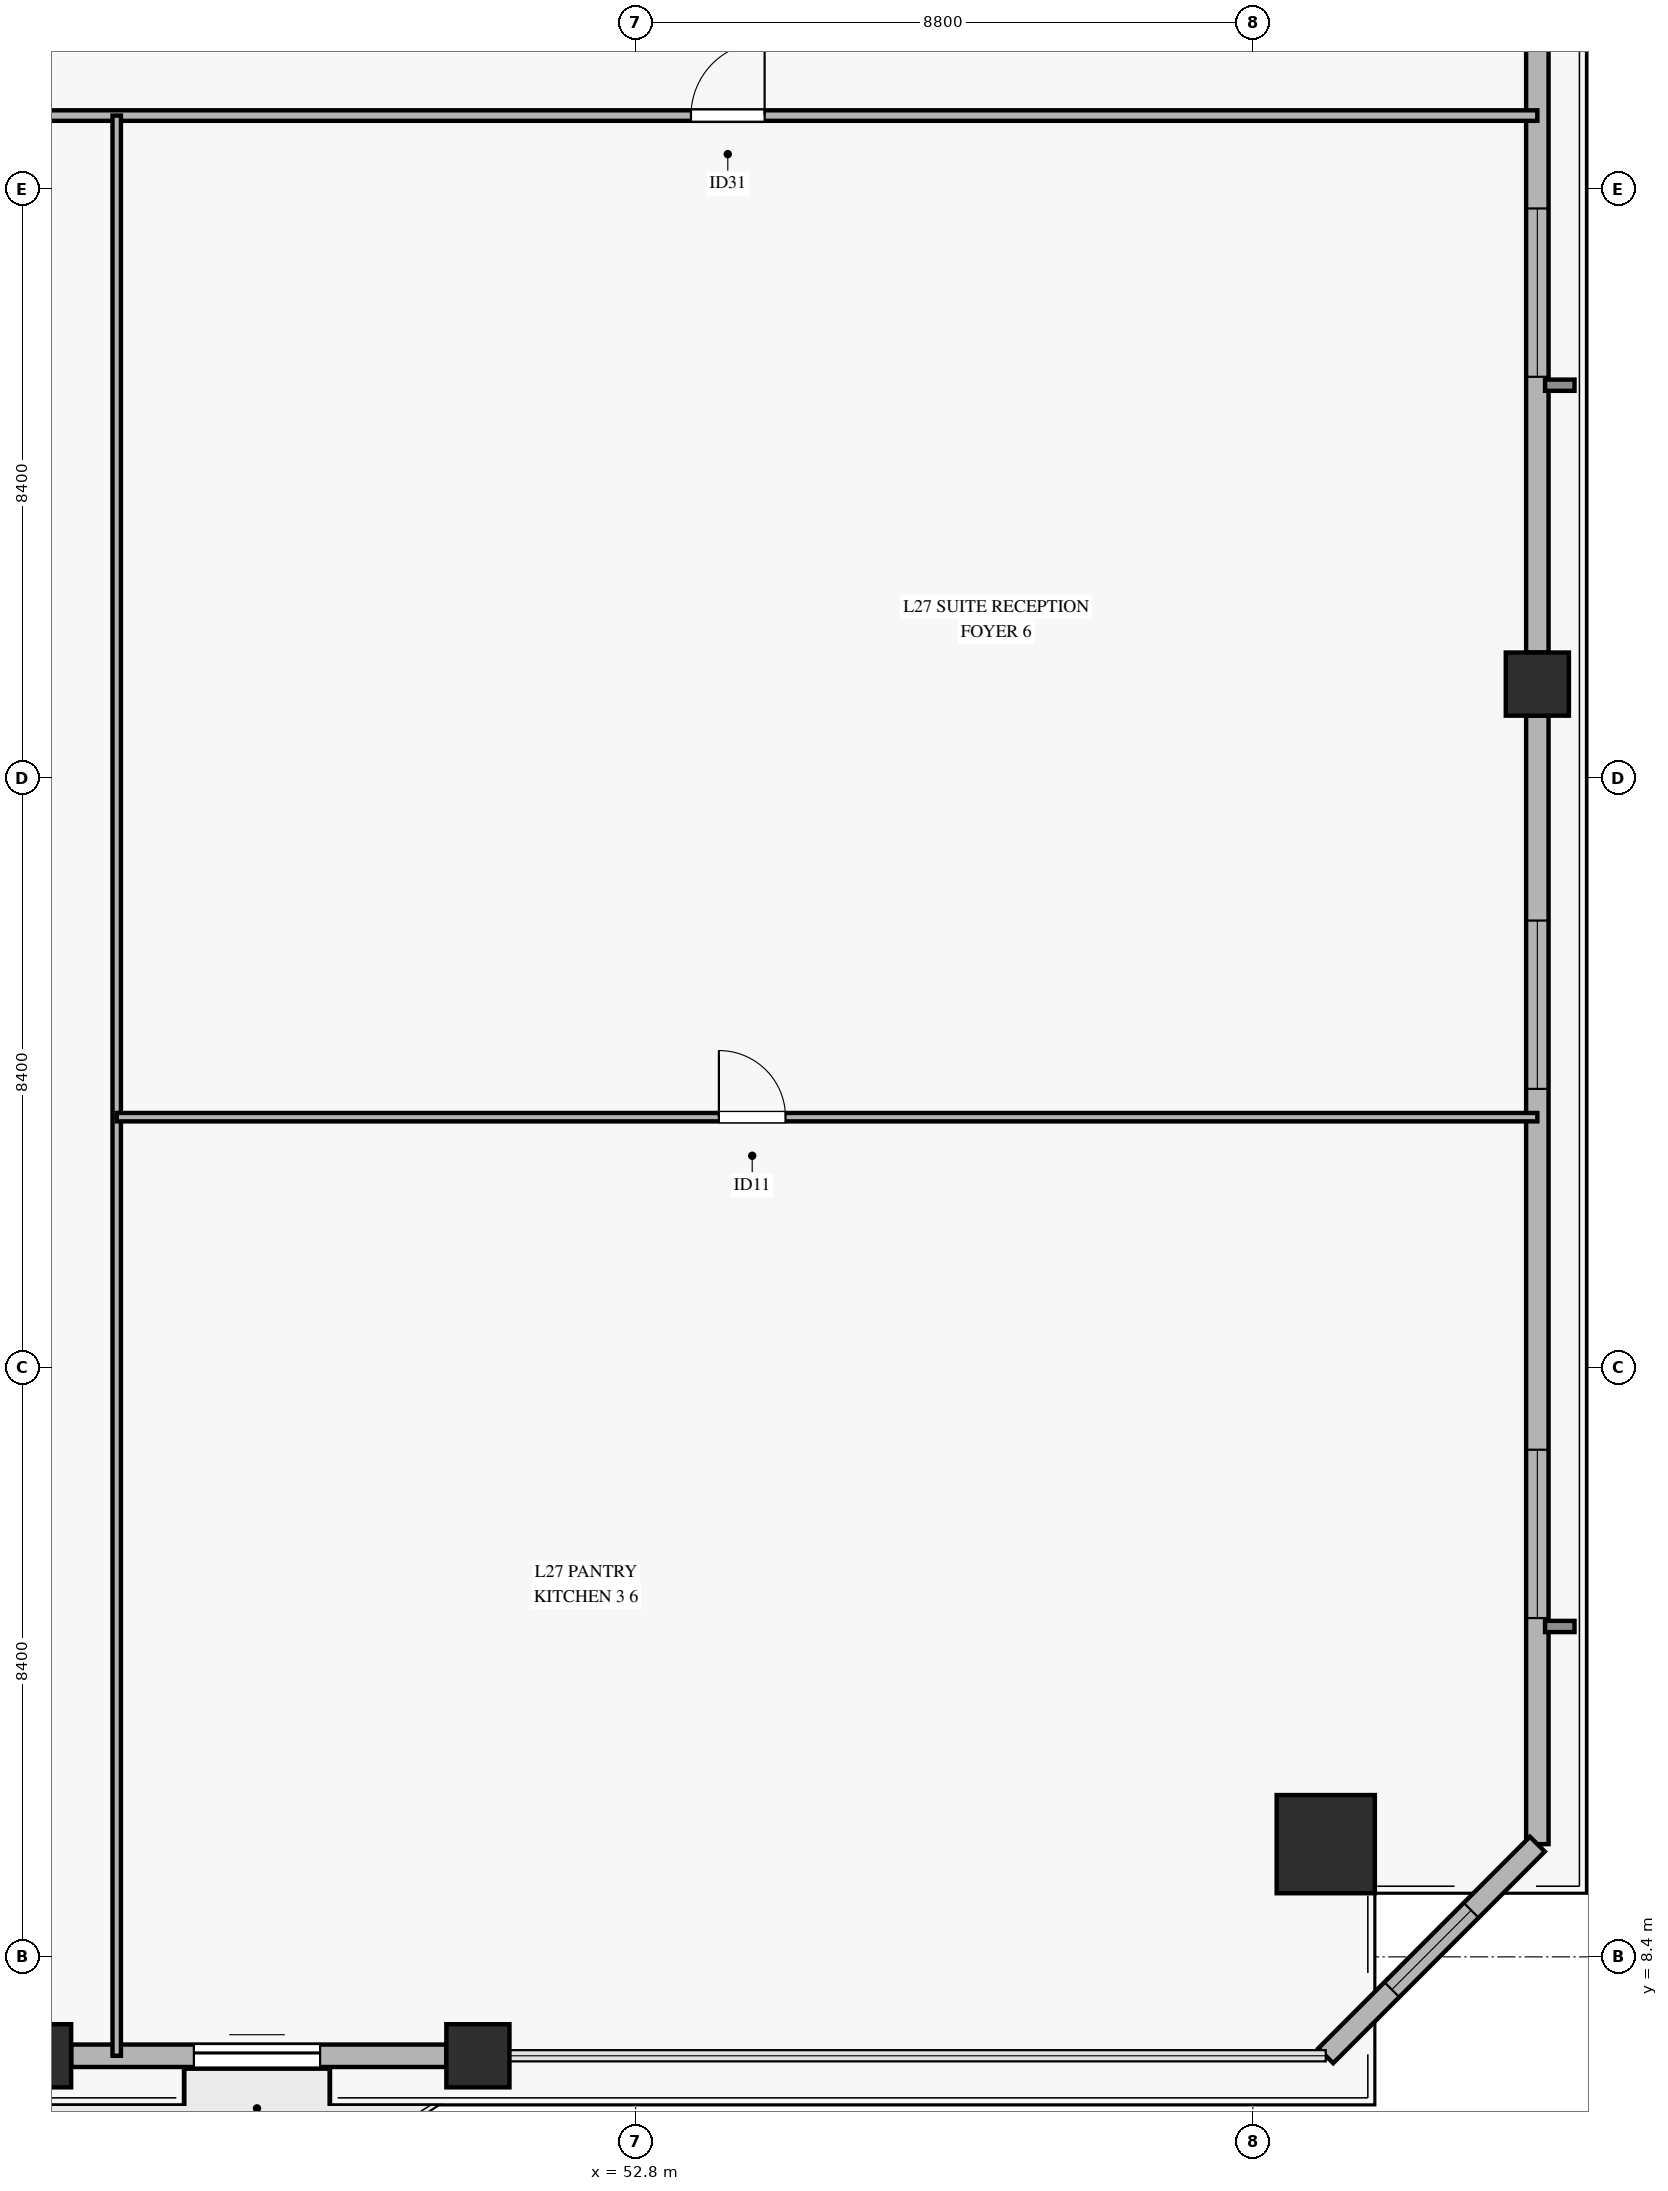
"""IFC4 building model, lengths in metres.
Left out: names, types, materials, properties, quantities, classifications, styles, units other than length and angle.
Written with IfcOpenShell. Run it as: python <this file> out.ifc"""

import sys

from ifc_helpers import new_model, si_unit, direction, frame, frame_2d, origin, origin_2d, place, context, subcontext, project, spatial, rectangle, hollow_rectangle, extrude, source, transform, mapped, element, fill, save


model = new_model("IFC4")
c1 = context("Model", 3, precision=1e-05, world=origin(), true_north=direction((0.0, 1.0)))
c2 = subcontext(c1, "Body", "Model", "MODEL_VIEW")
j1 = project(units=[si_unit("LENGTHUNIT", "METRE"), si_unit("PLANEANGLEUNIT", "RADIAN")], contexts=[c1])
p1 = place(None, origin())
s1 = spatial("IfcSite", under=j1, at=p1, CompositionType="ELEMENT")
p2 = place(p1, origin())
s2 = spatial("IfcBuilding", under=s1, at=p2, CompositionType="ELEMENT")
p3 = place(p2, frame((0.0, 0.0, 111.4)))
s3 = spatial("IfcBuildingStorey", under=s2, at=p3, CompositionType="ELEMENT", Elevation=111.4)
m1 = source(origin(), c2, "Body", "SweptSolid", [
    extrude(hollow_rectangle(XDim=1.4, YDim=1.4, WallThickness=0.065, at=origin_2d()), origin(), (0.0, 0.0, 1.0), 3.68),
])
p4 = place(p3, frame((62.639, 10.007, 0.0), z_axis=(0.0, 0.0, 1.0), x_axis=(1.0, 0.0, 0.0)))
e1 = element("IfcColumn", 1, at=p4, inside=s3, PredefinedType="COLUMN", context=c2, shape_type="MappedRepresentation", body=[
    mapped(m1, transform((0.0, 0.0, 0.0), x_axis=(1.0, 0.0, 0.0), y_axis=(0.0, 1.0, 0.0), z_axis=(0.0, 0.0, 1.0), scale=1.0)),
])
m2 = source(origin(), c2, "Body", "SweptSolid", [
    extrude(hollow_rectangle(XDim=0.9, YDim=0.9, WallThickness=0.04, at=origin_2d()), origin(), (0.0, 0.0, 1.0), 3.68),
])
for number, where, z_axis, x_axis in (
    (2, (44.3, 6.99, 0.0), (0.0, 0.0, 1.0), (1.0, 0.0, 0.0)),
    (3, (50.55, 6.99, 0.0), (0.0, 0.0, 1.0), (1.0, 0.0, 0.0)),
    (4, (65.656, 26.545, 0.0), (0.0, 0.0, 1.0), (1.0, 0.0, 0.0)),
):
    element("IfcColumn", number, at=place(p3, frame(where, z_axis=z_axis, x_axis=x_axis)), inside=s3, PredefinedType="COLUMN", context=c2, shape_type="MappedRepresentation", body=[
        mapped(m2, transform((0.0, 0.0, 0.0), x_axis=(1.0, 0.0, 0.0), y_axis=(0.0, 1.0, 0.0), z_axis=(0.0, 0.0, 1.0), scale=1.0)),
    ])
p5 = place(p3, frame((44.75, 6.99, 0.0), z_axis=(0.0, 0.0, 1.0), x_axis=(1.0, 0.0, 0.0)))
e5 = element("IfcWall", 5, at=p5, inside=s3, PredefinedType="SOLIDWALL", context=c2, shape_type="SweptSolid", body=[
    extrude(rectangle(XDim=5.35, YDim=0.32, at=frame_2d((2.675, 0.0))), origin(), (0.0, 0.0, 1.0), 3.16),
])
p6 = place(p5, frame((1.75, 0.0, 0.0)))
e6 = element("IfcOpeningElement", 6, at=p6, cuts=e5, PredefinedType="OPENING", context=c2, shape_type="SweptSolid", body=[
    extrude(rectangle(XDim=1.8, YDim=2.25, at=frame_2d((0.9, 1.125))), frame((0.0, 0.17, 0.0), z_axis=(0.0, -1.0, 0.0), x_axis=(1.0, 0.0, 0.0)), (0.0, 0.0, 1.0), 0.34),
])
p7 = place(p3, frame((65.656, 10.007, 0.0), z_axis=(0.0, 0.0, 1.0), x_axis=(0.0, 1.0, 0.0)))
e7 = element("IfcWall", 7, at=p7, inside=s3, PredefinedType="SOLIDWALL", context=c2, shape_type="SweptSolid", body=[
    extrude(rectangle(XDim=16.088, YDim=0.32, at=frame_2d((8.044, 0.0))), origin(), (0.0, 0.0, 1.0), 3.16),
])
p8 = place(p7, frame((3.223, 0.0, 0.45)))
e8 = element("IfcOpeningElement", 8, at=p8, cuts=e7, PredefinedType="OPENING", context=c2, shape_type="SweptSolid", body=[
    extrude(rectangle(XDim=2.4, YDim=2.1, at=frame_2d((1.2, 1.05))), frame((0.0, 0.17, 0.0), z_axis=(0.0, -1.0, 0.0), x_axis=(1.0, 0.0, 0.0)), (0.0, 0.0, 1.0), 0.34),
])
p9 = place(p7, frame((10.767, 0.0, 0.45)))
e9 = element("IfcOpeningElement", 9, at=p9, cuts=e7, PredefinedType="OPENING", context=c2, shape_type="SweptSolid", body=[
    extrude(rectangle(XDim=2.4, YDim=2.1, at=frame_2d((1.2, 1.05))), frame((0.0, 0.17, 0.0), z_axis=(0.0, -1.0, 0.0), x_axis=(1.0, 0.0, 0.0)), (0.0, 0.0, 1.0), 0.34),
])
p10 = place(p3, frame((65.656, 26.995, 0.0), z_axis=(0.0, 0.0, 1.0), x_axis=(0.0, 1.0, 0.0)))
e10 = element("IfcWall", 10, at=p10, inside=s3, PredefinedType="SOLIDWALL", context=c2, shape_type="SweptSolid", body=[
    extrude(rectangle(XDim=16.088, YDim=0.32, at=frame_2d((8.044, 0.0))), origin(), (0.0, 0.0, 1.0), 3.16),
])
p11 = place(p10, frame((3.931, 0.0, 0.45)))
e11 = element("IfcOpeningElement", 11, at=p11, cuts=e10, PredefinedType="OPENING", context=c2, shape_type="SweptSolid", body=[
    extrude(rectangle(XDim=2.4, YDim=2.1, at=frame_2d((1.2, 1.05))), frame((0.0, 0.17, 0.0), z_axis=(0.0, -1.0, 0.0), x_axis=(1.0, 0.0, 0.0)), (0.0, 0.0, 1.0), 0.34),
])
p12 = place(p3, frame((62.639, 6.99, 0.0), z_axis=(0.0, 0.0, 1.0), x_axis=(0.707106781187, 0.707106781187, 0.0)))
e12 = element("IfcWall", 12, at=p12, inside=s3, PredefinedType="SOLIDWALL", context=c2, shape_type="SweptSolid", body=[
    extrude(rectangle(XDim=4.267, YDim=0.3, at=frame_2d((2.133, 0.0))), origin(), (0.0, 0.0, 1.0), 3.16),
])
p13 = place(p12, frame((1.333, 0.0, 0.45)))
e13 = element("IfcOpeningElement", 13, at=p13, cuts=e12, PredefinedType="OPENING", context=c2, shape_type="SweptSolid", body=[
    extrude(rectangle(XDim=1.6, YDim=2.0, at=frame_2d((0.8, 1.0))), frame((0.0, 0.16, 0.0), z_axis=(0.0, -1.0, 0.0), x_axis=(1.0, 0.0, 0.0)), (0.0, 0.0, 1.0), 0.32),
])
p14 = place(p3, frame((4.744, 34.65, 0.0), z_axis=(0.0, 0.0, 1.0), x_axis=(1.0, 0.0, 0.0)))
e14 = element("IfcWall", 14, at=p14, inside=s3, PredefinedType="PARTITIONING", context=c2, shape_type="SweptSolid", body=[
    extrude(rectangle(XDim=60.912, YDim=0.15, at=frame_2d((30.456, 0.0))), origin(), (0.0, 0.0, 1.0), 2.765),
])
p15 = place(p14, frame((7.61, 0.0, 0.0)))
e15 = element("IfcOpeningElement", 15, at=p15, cuts=e14, PredefinedType="OPENING", context=c2, shape_type="SweptSolid", body=[
    extrude(rectangle(XDim=1.05, YDim=2.15, at=frame_2d((0.525, 1.075))), frame((0.0, 0.085, 0.0), z_axis=(0.0, -1.0, 0.0), x_axis=(1.0, 0.0, 0.0)), (0.0, 0.0, 1.0), 0.17),
])
p16 = place(p14, frame((20.391, 0.0, 0.0)))
e16 = element("IfcOpeningElement", 16, at=p16, cuts=e14, PredefinedType="OPENING", context=c2, shape_type="SweptSolid", body=[
    extrude(rectangle(XDim=1.05, YDim=2.15, at=frame_2d((0.525, 1.075))), frame((0.0, 0.085, 0.0), z_axis=(0.0, -1.0, 0.0), x_axis=(1.0, 0.0, 0.0)), (0.0, 0.0, 1.0), 0.17),
])
p17 = place(p14, frame((26.622, 0.0, 0.0)))
e17 = element("IfcOpeningElement", 17, at=p17, cuts=e14, PredefinedType="OPENING", context=c2, shape_type="SweptSolid", body=[
    extrude(rectangle(XDim=1.05, YDim=2.15, at=frame_2d((0.525, 1.075))), frame((0.0, 0.085, 0.0), z_axis=(0.0, -1.0, 0.0), x_axis=(1.0, 0.0, 0.0)), (0.0, 0.0, 1.0), 0.17),
])
p18 = place(p14, frame((32.462, 0.0, 0.0)))
e18 = element("IfcOpeningElement", 18, at=p18, cuts=e14, PredefinedType="OPENING", context=c2, shape_type="SweptSolid", body=[
    extrude(rectangle(XDim=1.05, YDim=2.15, at=frame_2d((0.525, 1.075))), frame((0.0, 0.085, 0.0), z_axis=(0.0, -1.0, 0.0), x_axis=(1.0, 0.0, 0.0)), (0.0, 0.0, 1.0), 0.17),
])
p19 = place(p14, frame((37.919, 0.0, 0.0)))
e19 = element("IfcOpeningElement", 19, at=p19, cuts=e14, PredefinedType="OPENING", context=c2, shape_type="SweptSolid", body=[
    extrude(rectangle(XDim=1.05, YDim=2.15, at=frame_2d((0.525, 1.075))), frame((0.0, 0.085, 0.0), z_axis=(0.0, -1.0, 0.0), x_axis=(1.0, 0.0, 0.0)), (0.0, 0.0, 1.0), 0.17),
])
p20 = place(p14, frame((48.844, 0.0, 0.0)))
e20 = element("IfcOpeningElement", 20, at=p20, cuts=e14, PredefinedType="OPENING", context=c2, shape_type="SweptSolid", body=[
    extrude(rectangle(XDim=1.05, YDim=2.15, at=frame_2d((0.525, 1.075))), frame((0.0, 0.085, 0.0), z_axis=(0.0, -1.0, 0.0), x_axis=(1.0, 0.0, 0.0)), (0.0, 0.0, 1.0), 0.17),
])
p21 = place(p3, frame((45.4, 6.99, 0.0), z_axis=(0.0, 0.0, 1.0), x_axis=(0.0, 1.0, 0.0)))
e21 = element("IfcWall", 21, at=p21, inside=s3, PredefinedType="PARTITIONING", context=c2, shape_type="SweptSolid", body=[
    extrude(rectangle(XDim=27.66, YDim=0.12, at=frame_2d((13.83, 0.0))), origin(), (0.0, 0.0, 1.0), 3.165),
])
p22 = place(p3, frame((45.4, 20.371, 0.0), z_axis=(0.0, 0.0, 1.0), x_axis=(1.0, 0.0, 0.0)))
e22 = element("IfcWall", 22, at=p22, inside=s3, PredefinedType="PARTITIONING", context=c2, shape_type="SweptSolid", body=[
    extrude(rectangle(XDim=20.256, YDim=0.12, at=frame_2d((10.128, 0.0))), origin(), (0.0, 0.0, 1.0), 2.765),
])
p23 = place(p22, frame((8.586, 0.0, 0.0)))
e23 = element("IfcOpeningElement", 23, at=p23, cuts=e22, PredefinedType="OPENING", context=c2, shape_type="SweptSolid", body=[
    extrude(rectangle(XDim=0.95, YDim=2.1, at=frame_2d((0.475, 1.05))), frame((0.0, 0.07, 0.0), z_axis=(0.0, -1.0, 0.0), x_axis=(1.0, 0.0, 0.0)), (0.0, 0.0, 1.0), 0.14),
])
m3 = source(origin(), c2, "Body", "SweptSolid", [
    extrude(rectangle(XDim=1.8, YDim=2.25, at=frame_2d((0.9, 1.125))), frame((0.0, 0.025, 0.0), z_axis=(0.0, -1.0, 0.0), x_axis=(1.0, 0.0, 0.0)), (0.0, 0.0, 1.0), 0.05),
])
p24 = place(p6, origin())
e24 = element("IfcDoor", 24, at=p24, inside=s3, OperationType="SLIDING_TO_LEFT", PredefinedType="DOOR", context=c2, shape_type="MappedRepresentation", body=[
    mapped(m3, transform((0.0, 0.0, 0.0), x_axis=(1.0, 0.0, 0.0), y_axis=(0.0, 1.0, 0.0), z_axis=(0.0, 0.0, 1.0), scale=1.0)),
])
fill(e6, e24)
m4 = source(origin(), c2, "Body", "SweptSolid", [
    extrude(rectangle(XDim=2.4, YDim=2.1, at=frame_2d((1.2, 1.05))), frame((0.0, 0.03, 0.0), z_axis=(0.0, -1.0, 0.0), x_axis=(1.0, 0.0, 0.0)), (0.0, 0.0, 1.0), 0.06),
])
p25 = place(p8, origin())
e25 = element("IfcWindow", 25, at=p25, inside=s3, PartitioningType="SINGLE_PANEL", PredefinedType="WINDOW", context=c2, shape_type="MappedRepresentation", body=[
    mapped(m4, transform((0.0, 0.0, 0.0), x_axis=(1.0, 0.0, 0.0), y_axis=(0.0, 1.0, 0.0), z_axis=(0.0, 0.0, 1.0), scale=1.0)),
])
fill(e8, e25)
p26 = place(p9, origin())
e26 = element("IfcWindow", 26, at=p26, inside=s3, PartitioningType="SINGLE_PANEL", PredefinedType="WINDOW", context=c2, shape_type="MappedRepresentation", body=[
    mapped(m4, transform((0.0, 0.0, 0.0), x_axis=(1.0, 0.0, 0.0), y_axis=(0.0, 1.0, 0.0), z_axis=(0.0, 0.0, 1.0), scale=1.0)),
])
fill(e9, e26)
p27 = place(p11, origin())
e27 = element("IfcWindow", 27, at=p27, inside=s3, PartitioningType="SINGLE_PANEL", PredefinedType="WINDOW", context=c2, shape_type="MappedRepresentation", body=[
    mapped(m4, transform((0.0, 0.0, 0.0), x_axis=(1.0, 0.0, 0.0), y_axis=(0.0, 1.0, 0.0), z_axis=(0.0, 0.0, 1.0), scale=1.0)),
])
fill(e11, e27)
m5 = source(origin(), c2, "Body", "SweptSolid", [
    extrude(rectangle(XDim=1.6, YDim=2.0, at=frame_2d((0.8, 1.0))), frame((0.0, 0.03, 0.0), z_axis=(0.0, -1.0, 0.0), x_axis=(1.0, 0.0, 0.0)), (0.0, 0.0, 1.0), 0.06),
])
p28 = place(p13, origin())
e28 = element("IfcWindow", 28, at=p28, inside=s3, PartitioningType="SINGLE_PANEL", PredefinedType="WINDOW", context=c2, shape_type="MappedRepresentation", body=[
    mapped(m5, transform((0.0, 0.0, 0.0), x_axis=(1.0, 0.0, 0.0), y_axis=(0.0, 1.0, 0.0), z_axis=(0.0, 0.0, 1.0), scale=1.0)),
])
fill(e13, e28)
m6 = source(origin(), c2, "Body", "SweptSolid", [
    extrude(rectangle(XDim=1.05, YDim=2.15, at=frame_2d((0.525, 1.075))), frame((0.0, 0.025, 0.0), z_axis=(0.0, -1.0, 0.0), x_axis=(1.0, 0.0, 0.0)), (0.0, 0.0, 1.0), 0.05),
])
p29 = place(p20, origin())
e29 = element("IfcDoor", 29, at=p29, inside=s3, OperationType="SINGLE_SWING_RIGHT", PredefinedType="DOOR", context=c2, shape_type="MappedRepresentation", body=[
    mapped(m6, transform((0.0, 0.0, 0.0), x_axis=(1.0, 0.0, 0.0), y_axis=(0.0, 1.0, 0.0), z_axis=(0.0, 0.0, 1.0), scale=1.0)),
])
fill(e20, e29)
m7 = source(origin(), c2, "Body", "SweptSolid", [
    extrude(rectangle(XDim=0.95, YDim=2.1, at=frame_2d((0.475, 1.05))), frame((0.0, 0.025, 0.0), z_axis=(0.0, -1.0, 0.0), x_axis=(1.0, 0.0, 0.0)), (0.0, 0.0, 1.0), 0.05),
])
p30 = place(p23, origin())
e30 = element("IfcDoor", 30, at=p30, inside=s3, OperationType="SINGLE_SWING_LEFT", PredefinedType="DOOR", context=c2, shape_type="MappedRepresentation", body=[
    mapped(m7, transform((0.0, 0.0, 0.0), x_axis=(1.0, 0.0, 0.0), y_axis=(0.0, 1.0, 0.0), z_axis=(0.0, 0.0, 1.0), scale=1.0)),
])
fill(e23, e30)
save(model, sys.argv[1])
